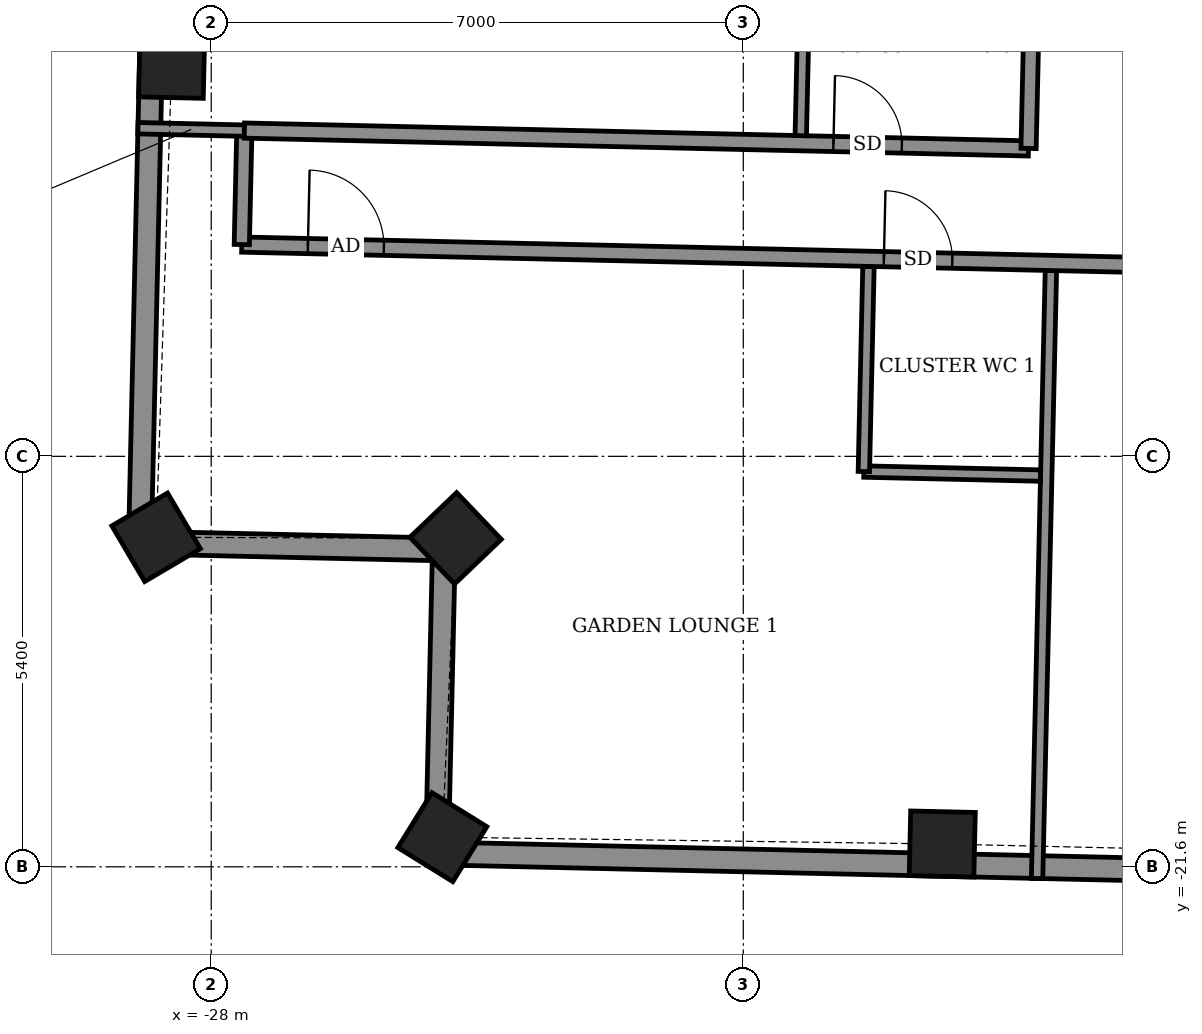
"""IFC4 building model, lengths in metres.
Left out: names, types, materials, properties, quantities, classifications, styles, units other than length and angle.
Written with IfcOpenShell. Run it as: python <this file> out.ifc"""

import sys

from ifc_helpers import new_model, si_unit, direction, frame, frame_2d, origin, origin_2d, place, context, subcontext, project, spatial, rectangle, extrude, element, fill, save


model = new_model("IFC4")
c1 = context("Model", 3, precision=1e-05, world=origin(), true_north=direction((0.0, 1.0)))
c2 = subcontext(c1, "Body", "Model", "MODEL_VIEW")
j1 = project(units=[si_unit("LENGTHUNIT", "METRE"), si_unit("PLANEANGLEUNIT", "RADIAN")], contexts=[c1])
p1 = place(None, origin())
s1 = spatial("IfcSite", under=j1, at=p1, CompositionType="ELEMENT")
p2 = place(p1, origin())
s2 = spatial("IfcBuilding", under=s1, at=p2, CompositionType="ELEMENT")
p3 = place(p2, frame((0.0, 0.0, 334.3)))
s3 = spatial("IfcBuildingStorey", under=s2, at=p3, CompositionType="ELEMENT", Elevation=334.3)
for number, where, z_axis, x_axis in (
    (1, (-28.52, -11.056, -0.55), (0.0, 0.0, 1.0), (-0.023, -1.0, 0.0)),
    (2, (-28.725, -17.265, -0.55), (0.0, 0.0, 1.0), (0.508, -0.861, 0.0)),
    (3, (-24.785, -17.278, -0.55), (0.0, 0.0, 1.0), (0.691, -0.723, 0.0)),
    (4, (-24.959, -21.21, -0.55), (0.0, 0.0, 1.0), (0.85, -0.527, 0.0)),
    (5, (-18.382, -21.3, -0.55), (0.0, 0.0, 1.0), (1.0, -0.023, 0.0)),
):
    element("IfcColumn", number, at=place(p3, frame(where, z_axis=z_axis, x_axis=x_axis)), inside=s3, PredefinedType="COLUMN", context=c2, shape_type="SweptSolid", body=[
        extrude(rectangle(XDim=0.85, YDim=0.85, at=origin_2d()), origin(), (0.0, 0.0, 1.0), 3.6),
    ])
p4 = place(p3, frame((-28.639, -4.189, 0.0), z_axis=(0.0, 0.0, 1.0), x_axis=(-0.022744179961, -0.999741317681, 0.0)))
e6 = element("IfcWall", 6, at=p4, inside=s3, PredefinedType="SOLIDWALL", context=c2, shape_type="SweptSolid", body=[
    extrude(rectangle(XDim=13.149, YDim=0.3, at=frame_2d((6.575, 0.0))), origin(), (0.0, 0.0, 1.0), 2.55),
])
p5 = place(p3, frame((-28.938, -17.335, 0.0), z_axis=(0.0, 0.0, 1.0), x_axis=(0.999746353029, -0.022521758502, 0.0)))
e7 = element("IfcWall", 7, at=p5, inside=s3, PredefinedType="SOLIDWALL", context=c2, shape_type="SweptSolid", body=[
    extrude(rectangle(XDim=4.0, YDim=0.3, at=frame_2d((2.0, 0.0))), origin(), (0.0, 0.0, 1.0), 2.55),
])
p6 = place(p3, frame((-24.933, -17.16, 0.0), z_axis=(0.0, 0.0, 1.0), x_axis=(-0.022724005797, -0.999741776441, 0.0)))
e8 = element("IfcWall", 8, at=p6, inside=s3, PredefinedType="SOLIDWALL", context=c2, shape_type="SweptSolid", body=[
    extrude(rectangle(XDim=4.265, YDim=0.3, at=frame_2d((2.133, 0.0))), origin(), (0.0, 0.0, 1.0), 2.55),
])
p7 = place(p3, frame((-25.03, -21.424, 0.0), z_axis=(0.0, 0.0, 1.0), x_axis=(0.9997425899, -0.022688189451, 0.0)))
e9 = element("IfcWall", 9, at=p7, inside=s3, PredefinedType="SOLIDWALL", context=c2, shape_type="SweptSolid", body=[
    extrude(rectangle(XDim=47.25, YDim=0.3, at=frame_2d((23.625, 0.0))), origin(), (0.0, 0.0, 1.0), 2.55),
])
p8 = place(p3, frame((-17.135, -21.754, 0.0), z_axis=(0.0, 0.0, 1.0), x_axis=(0.022766465539, 0.999740810434, 0.0)))
e10 = element("IfcWall", 10, at=p8, inside=s3, PredefinedType="PARTITIONING", context=c2, shape_type="SweptSolid", body=[
    extrude(rectangle(XDim=8.0, YDim=0.15, at=frame_2d((4.0, 0.0))), origin(), (0.0, 0.0, 1.0), 2.55),
])
p9 = place(p3, frame((-19.414, -16.4, 0.0), z_axis=(0.0, 0.0, 1.0), x_axis=(0.999740260747, -0.02279059109, 0.0)))
e11 = element("IfcWall", 11, at=p9, inside=s3, PredefinedType="PARTITIONING", context=c2, shape_type="SweptSolid", body=[
    extrude(rectangle(XDim=2.324, YDim=0.15, at=frame_2d((1.162, 0.0))), origin(), (0.0, 0.0, 1.0), 3.05),
])
p10 = place(p3, frame((-19.414, -16.4, 0.0), z_axis=(0.0, 0.0, 1.0), x_axis=(0.02260842146, 0.999744396973, 0.0)))
e12 = element("IfcWall", 12, at=p10, inside=s3, PredefinedType="PARTITIONING", context=c2, shape_type="SweptSolid", body=[
    extrude(rectangle(XDim=2.7, YDim=0.15, at=frame_2d((1.35, 0.0))), origin(), (0.0, 0.0, 1.0), 3.05),
])
p11 = place(p3, frame((-27.598, -13.414, 0.0), z_axis=(0.0, 0.0, 1.0), x_axis=(0.999742489831, -0.022692598482, 0.0)))
e13 = element("IfcWall", 13, at=p11, inside=s3, PredefinedType="PARTITIONING", context=c2, shape_type="SweptSolid", body=[
    extrude(rectangle(XDim=52.75, YDim=0.2, at=frame_2d((26.375, 0.0))), origin(), (0.0, 0.0, 1.0), 3.05),
])
p12 = place(p11, frame((0.87, 0.0, 0.0)))
e14 = element("IfcOpeningElement", 14, at=p12, cuts=e13, PredefinedType="OPENING", context=c2, shape_type="SweptSolid", body=[
    extrude(rectangle(XDim=1.0, YDim=2.1, at=frame_2d((0.5, 1.05))), frame((0.0, 0.11, 0.0), z_axis=(0.0, -1.0, 0.0), x_axis=(1.0, 0.0, 0.0)), (0.0, 0.0, 1.0), 0.22),
])
p13 = place(p11, frame((8.45, 0.0, 0.0)))
e15 = element("IfcOpeningElement", 15, at=p13, cuts=e13, PredefinedType="OPENING", context=c2, shape_type="SweptSolid", body=[
    extrude(rectangle(XDim=0.9, YDim=2.1, at=frame_2d((0.45, 1.05))), frame((0.0, 0.11, 0.0), z_axis=(0.0, -1.0, 0.0), x_axis=(1.0, 0.0, 0.0)), (0.0, 0.0, 1.0), 0.22),
])
p14 = place(p11, frame((11.798, 0.0, 0.0)))
e16 = element("IfcOpeningElement", 16, at=p14, cuts=e13, PredefinedType="OPENING", context=c2, shape_type="SweptSolid", body=[
    extrude(rectangle(XDim=1.0, YDim=2.1, at=frame_2d((0.5, 1.05))), frame((0.0, 0.11, 0.0), z_axis=(0.0, -1.0, 0.0), x_axis=(1.0, 0.0, 0.0)), (0.0, 0.0, 1.0), 0.22),
])
p15 = place(p11, frame((18.05, 0.0, 0.0)))
e17 = element("IfcOpeningElement", 17, at=p15, cuts=e13, PredefinedType="OPENING", context=c2, shape_type="SweptSolid", body=[
    extrude(rectangle(XDim=1.0, YDim=2.1, at=frame_2d((0.5, 1.05))), frame((0.0, 0.11, 0.0), z_axis=(0.0, -1.0, 0.0), x_axis=(1.0, 0.0, 0.0)), (0.0, 0.0, 1.0), 0.22),
])
p16 = place(p11, frame((22.85, 0.0, 0.0)))
e18 = element("IfcOpeningElement", 18, at=p16, cuts=e13, PredefinedType="OPENING", context=c2, shape_type="SweptSolid", body=[
    extrude(rectangle(XDim=0.9, YDim=2.1, at=frame_2d((0.45, 1.05))), frame((0.0, 0.11, 0.0), z_axis=(0.0, -1.0, 0.0), x_axis=(1.0, 0.0, 0.0)), (0.0, 0.0, 1.0), 0.22),
])
p17 = place(p11, frame((27.65, 0.0, 0.0)))
e19 = element("IfcOpeningElement", 19, at=p17, cuts=e13, PredefinedType="OPENING", context=c2, shape_type="SweptSolid", body=[
    extrude(rectangle(XDim=1.0, YDim=2.1, at=frame_2d((0.5, 1.05))), frame((0.0, 0.11, 0.0), z_axis=(0.0, -1.0, 0.0), x_axis=(1.0, 0.0, 0.0)), (0.0, 0.0, 1.0), 0.22),
])
p18 = place(p11, frame((25.25, 0.0, 0.0)))
e20 = element("IfcOpeningElement", 20, at=p18, cuts=e13, PredefinedType="OPENING", context=c2, shape_type="SweptSolid", body=[
    extrude(rectangle(XDim=0.9, YDim=2.1, at=frame_2d((0.45, 1.05))), frame((0.0, 0.11, 0.0), z_axis=(0.0, -1.0, 0.0), x_axis=(1.0, 0.0, 0.0)), (0.0, 0.0, 1.0), 0.22),
])
p19 = place(p11, frame((29.95, 0.0, 0.0)))
e21 = element("IfcOpeningElement", 21, at=p19, cuts=e13, PredefinedType="OPENING", context=c2, shape_type="SweptSolid", body=[
    extrude(rectangle(XDim=1.0, YDim=2.1, at=frame_2d((0.5, 1.05))), frame((0.0, 0.11, 0.0), z_axis=(0.0, -1.0, 0.0), x_axis=(1.0, 0.0, 0.0)), (0.0, 0.0, 1.0), 0.22),
])
p20 = place(p11, frame((33.25, 0.0, 0.0)))
e22 = element("IfcOpeningElement", 22, at=p20, cuts=e13, PredefinedType="OPENING", context=c2, shape_type="SweptSolid", body=[
    extrude(rectangle(XDim=0.9, YDim=2.1, at=frame_2d((0.45, 1.05))), frame((0.0, 0.11, 0.0), z_axis=(0.0, -1.0, 0.0), x_axis=(1.0, 0.0, 0.0)), (0.0, 0.0, 1.0), 0.22),
])
p21 = place(p11, frame((36.791, 0.0, 0.0)))
e23 = element("IfcOpeningElement", 23, at=p21, cuts=e13, PredefinedType="OPENING", context=c2, shape_type="SweptSolid", body=[
    extrude(rectangle(XDim=1.0, YDim=2.1, at=frame_2d((0.5, 1.05))), frame((0.0, 0.11, 0.0), z_axis=(0.0, -1.0, 0.0), x_axis=(1.0, 0.0, 0.0)), (0.0, 0.0, 1.0), 0.22),
])
p22 = place(p11, frame((47.389, 0.0, 0.0)))
e24 = element("IfcOpeningElement", 24, at=p22, cuts=e13, PredefinedType="OPENING", context=c2, shape_type="SweptSolid", body=[
    extrude(rectangle(XDim=1.0, YDim=2.1, at=frame_2d((0.5, 1.05))), frame((0.0, 0.11, 0.0), z_axis=(0.0, -1.0, 0.0), x_axis=(1.0, 0.0, 0.0)), (0.0, 0.0, 1.0), 0.22),
])
p23 = place(p11, frame((43.05, 0.0, 0.0)))
e25 = element("IfcOpeningElement", 25, at=p23, cuts=e13, PredefinedType="OPENING", context=c2, shape_type="SweptSolid", body=[
    extrude(rectangle(XDim=0.9, YDim=2.1, at=frame_2d((0.45, 1.05))), frame((0.0, 0.11, 0.0), z_axis=(0.0, -1.0, 0.0), x_axis=(1.0, 0.0, 0.0)), (0.0, 0.0, 1.0), 0.22),
])
p24 = place(p3, frame((-27.598, -13.414, 0.0), z_axis=(0.0, 0.0, 1.0), x_axis=(0.022617910375, 0.999744182344, 0.0)))
e26 = element("IfcWall", 26, at=p24, inside=s3, PredefinedType="PARTITIONING", context=c2, shape_type="SweptSolid", body=[
    extrude(rectangle(XDim=1.5, YDim=0.2, at=frame_2d((0.75, 0.0))), origin(), (0.0, 0.0, 1.0), 3.05),
])
p25 = place(p3, frame((-28.964, -11.883, 0.0), z_axis=(0.0, 0.0, 1.0), x_axis=(0.999740667531, -0.022772739949, 0.0)))
e27 = element("IfcWall", 27, at=p25, inside=s3, PredefinedType="PARTITIONING", context=c2, shape_type="SweptSolid", body=[
    extrude(rectangle(XDim=1.404, YDim=0.15, at=frame_2d((0.702, 0.0))), origin(), (0.0, 0.0, 1.0), 2.55),
])
p26 = place(p3, frame((-27.564, -11.914, 0.0), z_axis=(0.0, 0.0, 1.0), x_axis=(0.999740930851, -0.02276117706, 0.0)))
e28 = element("IfcWall", 28, at=p26, inside=s3, PredefinedType="PARTITIONING", context=c2, shape_type="SweptSolid", body=[
    extrude(rectangle(XDim=10.319, YDim=0.2, at=frame_2d((5.159, 0.0))), origin(), (0.0, 0.0, 1.0), 3.05),
])
p27 = place(p26, frame((7.752, 0.0, 0.0)))
e29 = element("IfcOpeningElement", 29, at=p27, cuts=e28, PredefinedType="OPENING", context=c2, shape_type="SweptSolid", body=[
    extrude(rectangle(XDim=0.9, YDim=2.1, at=frame_2d((0.45, 1.05))), frame((0.0, 0.11, 0.0), z_axis=(0.0, -1.0, 0.0), x_axis=(1.0, 0.0, 0.0)), (0.0, 0.0, 1.0), 0.22),
])
p28 = place(p3, frame((-20.244, -11.981, 0.0), z_axis=(0.0, 0.0, 1.0), x_axis=(0.02274801823, 0.999741230352, 0.0)))
e30 = element("IfcWall", 30, at=p28, inside=s3, PredefinedType="PARTITIONING", context=c2, shape_type="SweptSolid", body=[
    extrude(rectangle(XDim=2.501, YDim=0.15, at=frame_2d((1.25, 0.0))), origin(), (0.0, 0.0, 1.0), 3.05),
])
p29 = place(p3, frame((-17.247, -12.149, 0.0), z_axis=(0.0, 0.0, 1.0), x_axis=(0.022696191528, 0.999742408268, 0.0)))
e31 = element("IfcWall", 31, at=p29, inside=s3, PredefinedType="PARTITIONING", context=c2, shape_type="SweptSolid", body=[
    extrude(rectangle(XDim=25.074, YDim=0.2, at=frame_2d((12.537, 0.0))), origin(), (0.0, 0.0, 1.0), 3.05),
])
p30 = place(p29, frame((18.522, 0.0, 0.0)))
e32 = element("IfcOpeningElement", 32, at=p30, cuts=e31, PredefinedType="OPENING", context=c2, shape_type="SweptSolid", body=[
    extrude(rectangle(XDim=1.0, YDim=2.1, at=frame_2d((0.5, 1.05))), frame((0.0, 0.11, 0.0), z_axis=(0.0, -1.0, 0.0), x_axis=(1.0, 0.0, 0.0)), (0.0, 0.0, 1.0), 0.22),
])
p31 = place(p29, frame((11.699, 0.0, 0.0)))
e33 = element("IfcOpeningElement", 33, at=p31, cuts=e31, PredefinedType="OPENING", context=c2, shape_type="SweptSolid", body=[
    extrude(rectangle(XDim=1.0, YDim=2.1, at=frame_2d((0.5, 1.05))), frame((0.0, 0.11, 0.0), z_axis=(0.0, -1.0, 0.0), x_axis=(1.0, 0.0, 0.0)), (0.0, 0.0, 1.0), 0.22),
])
p32 = place(p29, frame((6.075, 0.0, 0.0)))
e34 = element("IfcOpeningElement", 34, at=p32, cuts=e31, PredefinedType="OPENING", context=c2, shape_type="SweptSolid", body=[
    extrude(rectangle(XDim=1.0, YDim=2.1, at=frame_2d((0.5, 1.05))), frame((0.0, 0.11, 0.0), z_axis=(0.0, -1.0, 0.0), x_axis=(1.0, 0.0, 0.0)), (0.0, 0.0, 1.0), 0.22),
])
p33 = place(p12, origin())
e35 = element("IfcDoor", 35, at=p33, inside=s3, OperationType="SINGLE_SWING_LEFT", PredefinedType="DOOR", context=c2, shape_type="SweptSolid", body=[
    extrude(rectangle(XDim=1.0, YDim=2.1, at=frame_2d((0.5, 1.05))), frame((0.0, 0.025, 0.0), z_axis=(0.0, -1.0, 0.0), x_axis=(1.0, 0.0, 0.0)), (0.0, 0.0, 1.0), 0.05),
])
fill(e14, e35)
p34 = place(p13, origin())
e36 = element("IfcDoor", 36, at=p34, inside=s3, OperationType="SINGLE_SWING_LEFT", PredefinedType="DOOR", context=c2, shape_type="SweptSolid", body=[
    extrude(rectangle(XDim=0.9, YDim=2.1, at=frame_2d((0.45, 1.05))), frame((0.0, 0.025, 0.0), z_axis=(0.0, -1.0, 0.0), x_axis=(1.0, 0.0, 0.0)), (0.0, 0.0, 1.0), 0.05),
])
fill(e15, e36)
p35 = place(p27, origin())
e37 = element("IfcDoor", 37, at=p35, inside=s3, OperationType="SINGLE_SWING_LEFT", PredefinedType="DOOR", context=c2, shape_type="SweptSolid", body=[
    extrude(rectangle(XDim=0.9, YDim=2.1, at=frame_2d((0.45, 1.05))), frame((0.0, 0.025, 0.0), z_axis=(0.0, -1.0, 0.0), x_axis=(1.0, 0.0, 0.0)), (0.0, 0.0, 1.0), 0.05),
])
fill(e29, e37)
save(model, sys.argv[1])
